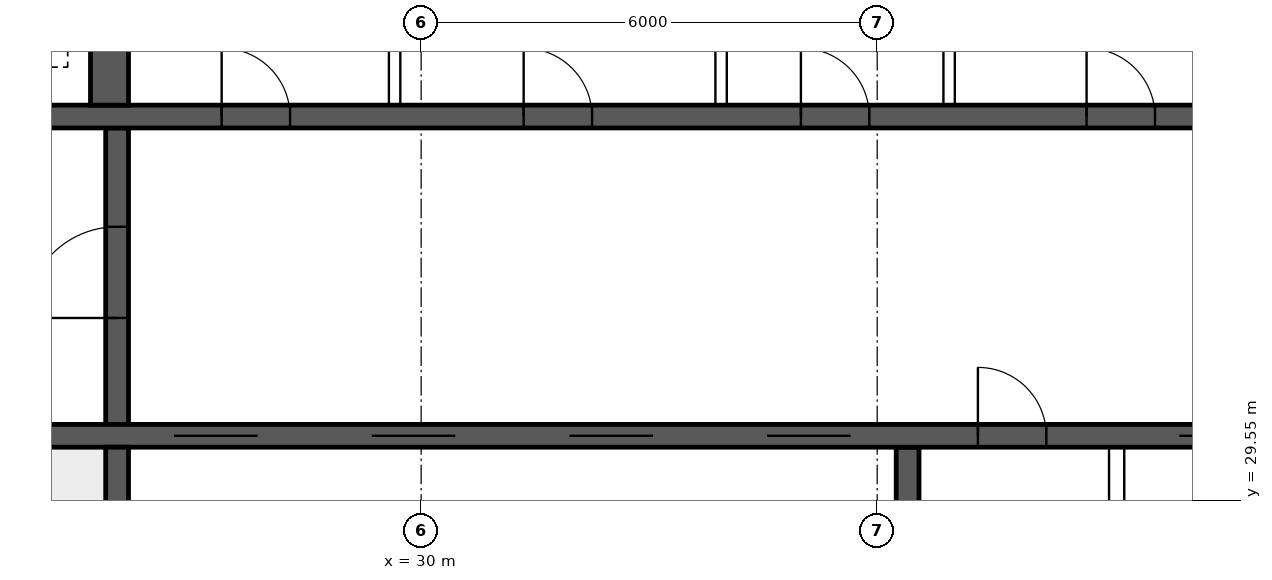
"""IFC4 building model, lengths in metres.
Left out: names, types, materials, properties, quantities, classifications, styles, units other than length and angle.
Written with IfcOpenShell. Run it as: python <this file> out.ifc"""

import sys

from ifc_helpers import new_model, si_unit, direction, frame, frame_2d, origin, place, context, subcontext, project, spatial, rectangle, extrude, element, fill, save


model = new_model("IFC4")
c1 = context("Model", 3, precision=1e-05, world=origin(), true_north=direction((0.0, 1.0)))
c2 = subcontext(c1, "Body", "Model", "MODEL_VIEW")
j1 = project(units=[si_unit("LENGTHUNIT", "METRE"), si_unit("PLANEANGLEUNIT", "RADIAN")], contexts=[c1])
p1 = place(None, origin())
s1 = spatial("IfcSite", under=j1, at=p1, CompositionType="ELEMENT")
p2 = place(p1, origin())
s2 = spatial("IfcBuilding", under=s1, at=p2, CompositionType="ELEMENT")
p3 = place(p2, frame((0.0, 0.0, 140.35)))
s3 = spatial("IfcBuildingStorey", under=s2, at=p3, CompositionType="ELEMENT", Elevation=140.35)
p4 = place(p3, frame((18.475, 30.4, 0.0), z_axis=(0.0, 0.0, 1.0), x_axis=(1.0, 0.0, 0.0)))
e1 = element("IfcWall", 1, at=p4, inside=s3, PredefinedType="SHEAR", context=c2, shape_type="SweptSolid", body=[
    extrude(rectangle(XDim=47.05, YDim=0.3, at=frame_2d((23.525, 0.0))), origin(), (0.0, 0.0, 1.0), 4.5),
])
p5 = place(p4, frame((0.4, 0.0, 0.0)))
e2 = element("IfcOpeningElement", 2, at=p5, cuts=e1, PredefinedType="OPENING", context=c2, shape_type="SweptSolid", body=[
    extrude(rectangle(XDim=1.0, YDim=2.1, at=frame_2d((0.5, 1.05))), frame((0.0, 0.16, 0.0), z_axis=(0.0, -1.0, 0.0), x_axis=(1.0, 0.0, 0.0)), (0.0, 0.0, 1.0), 0.32),
])
p6 = place(p4, frame((45.65, 0.0, 0.0)))
e3 = element("IfcOpeningElement", 3, at=p6, cuts=e1, PredefinedType="OPENING", context=c2, shape_type="SweptSolid", body=[
    extrude(rectangle(XDim=1.0, YDim=2.1, at=frame_2d((0.5, 1.05))), frame((0.0, 0.16, 0.0), z_axis=(0.0, -1.0, 0.0), x_axis=(1.0, 0.0, 0.0)), (0.0, 0.0, 1.0), 0.32),
])
p7 = place(p4, frame((8.275, 0.0, 0.0)))
e4 = element("IfcOpeningElement", 4, at=p7, cuts=e1, PredefinedType="OPENING", context=c2, shape_type="SweptSolid", body=[
    extrude(rectangle(XDim=1.1, YDim=2.1, at=frame_2d((0.55, 1.05))), frame((0.0, 0.16, 0.0), z_axis=(0.0, -1.0, 0.0), x_axis=(1.0, 0.0, 0.0)), (0.0, 0.0, 1.0), 0.32),
])
p8 = place(p4, frame((10.875, 0.0, 0.0)))
e5 = element("IfcOpeningElement", 5, at=p8, cuts=e1, PredefinedType="OPENING", context=c2, shape_type="SweptSolid", body=[
    extrude(rectangle(XDim=1.1, YDim=2.1, at=frame_2d((0.55, 1.05))), frame((0.0, 0.16, 0.0), z_axis=(0.0, -1.0, 0.0), x_axis=(1.0, 0.0, 0.0)), (0.0, 0.0, 1.0), 0.32),
])
p9 = place(p4, frame((13.475, 0.0, 0.0)))
e6 = element("IfcOpeningElement", 6, at=p9, cuts=e1, PredefinedType="OPENING", context=c2, shape_type="SweptSolid", body=[
    extrude(rectangle(XDim=1.1, YDim=2.1, at=frame_2d((0.55, 1.05))), frame((0.0, 0.16, 0.0), z_axis=(0.0, -1.0, 0.0), x_axis=(1.0, 0.0, 0.0)), (0.0, 0.0, 1.0), 0.32),
])
p10 = place(p4, frame((16.075, 0.0, 0.0)))
e7 = element("IfcOpeningElement", 7, at=p10, cuts=e1, PredefinedType="OPENING", context=c2, shape_type="SweptSolid", body=[
    extrude(rectangle(XDim=1.1, YDim=2.1, at=frame_2d((0.55, 1.05))), frame((0.0, 0.16, 0.0), z_axis=(0.0, -1.0, 0.0), x_axis=(1.0, 0.0, 0.0)), (0.0, 0.0, 1.0), 0.32),
])
p11 = place(p4, frame((18.85, 0.0, 0.0)))
e8 = element("IfcOpeningElement", 8, at=p11, cuts=e1, PredefinedType="OPENING", context=c2, shape_type="SweptSolid", body=[
    extrude(rectangle(XDim=0.9, YDim=2.1, at=frame_2d((0.45, 1.05))), frame((0.0, 0.16, 0.0), z_axis=(0.0, -1.0, 0.0), x_axis=(1.0, 0.0, 0.0)), (0.0, 0.0, 1.0), 0.32),
])
p12 = place(p4, frame((21.5, 0.0, 0.0)))
e9 = element("IfcOpeningElement", 9, at=p12, cuts=e1, PredefinedType="OPENING", context=c2, shape_type="SweptSolid", body=[
    extrude(rectangle(XDim=1.1, YDim=2.1, at=frame_2d((0.55, 1.05))), frame((0.0, 0.16, 0.0), z_axis=(0.0, -1.0, 0.0), x_axis=(1.0, 0.0, 0.0)), (0.0, 0.0, 1.0), 0.32),
])
p13 = place(p4, frame((30.142, 0.0, 0.0)))
e10 = element("IfcOpeningElement", 10, at=p13, cuts=e1, PredefinedType="OPENING", context=c2, shape_type="SweptSolid", body=[
    extrude(rectangle(XDim=1.1, YDim=2.1, at=frame_2d((0.55, 1.05))), frame((0.0, 0.16, 0.0), z_axis=(0.0, -1.0, 0.0), x_axis=(1.0, 0.0, 0.0)), (0.0, 0.0, 1.0), 0.32),
])
p14 = place(p4, frame((33.675, 0.0, 0.0)))
e11 = element("IfcOpeningElement", 11, at=p14, cuts=e1, PredefinedType="OPENING", context=c2, shape_type="SweptSolid", body=[
    extrude(rectangle(XDim=1.1, YDim=2.1, at=frame_2d((0.55, 1.05))), frame((0.0, 0.16, 0.0), z_axis=(0.0, -1.0, 0.0), x_axis=(1.0, 0.0, 0.0)), (0.0, 0.0, 1.0), 0.32),
])
p15 = place(p4, frame((37.208, 0.0, 0.0)))
e12 = element("IfcOpeningElement", 12, at=p15, cuts=e1, PredefinedType="OPENING", context=c2, shape_type="SweptSolid", body=[
    extrude(rectangle(XDim=1.1, YDim=2.1, at=frame_2d((0.55, 1.05))), frame((0.0, 0.16, 0.0), z_axis=(0.0, -1.0, 0.0), x_axis=(1.0, 0.0, 0.0)), (0.0, 0.0, 1.0), 0.32),
])
p16 = place(p3, frame((18.475, 34.6, 0.0), z_axis=(0.0, 0.0, 1.0), x_axis=(1.0, 0.0, 0.0)))
e13 = element("IfcWall", 13, at=p16, inside=s3, PredefinedType="SHEAR", context=c2, shape_type="SweptSolid", body=[
    extrude(rectangle(XDim=47.05, YDim=0.3, at=frame_2d((23.525, 0.0))), origin(), (0.0, 0.0, 1.0), 4.5),
])
p17 = place(p16, frame((0.9, 0.0, 0.0)))
e14 = element("IfcOpeningElement", 14, at=p17, cuts=e13, PredefinedType="OPENING", context=c2, shape_type="SweptSolid", body=[
    extrude(rectangle(XDim=1.1, YDim=2.1, at=frame_2d((0.55, 1.05))), frame((0.0, 0.16, 0.0), z_axis=(0.0, -1.0, 0.0), x_axis=(1.0, 0.0, 0.0)), (0.0, 0.0, 1.0), 0.32),
])
p18 = place(p16, frame((45.05, 0.0, 0.0)))
e15 = element("IfcOpeningElement", 15, at=p18, cuts=e13, PredefinedType="OPENING", context=c2, shape_type="SweptSolid", body=[
    extrude(rectangle(XDim=1.1, YDim=2.1, at=frame_2d((0.55, 1.05))), frame((0.0, 0.16, 0.0), z_axis=(0.0, -1.0, 0.0), x_axis=(1.0, 0.0, 0.0)), (0.0, 0.0, 1.0), 0.32),
])
p19 = place(p16, frame((4.125, 0.0, 0.0)))
e16 = element("IfcOpeningElement", 16, at=p19, cuts=e13, PredefinedType="OPENING", context=c2, shape_type="SweptSolid", body=[
    extrude(rectangle(XDim=0.9, YDim=2.1, at=frame_2d((0.45, 1.05))), frame((0.0, 0.16, 0.0), z_axis=(0.0, -1.0, 0.0), x_axis=(1.0, 0.0, 0.0)), (0.0, 0.0, 1.0), 0.32),
])
p20 = place(p16, frame((42.025, 0.0, 0.0)))
e17 = element("IfcOpeningElement", 17, at=p20, cuts=e13, PredefinedType="OPENING", context=c2, shape_type="SweptSolid", body=[
    extrude(rectangle(XDim=0.9, YDim=2.1, at=frame_2d((0.45, 1.05))), frame((0.0, 0.16, 0.0), z_axis=(0.0, -1.0, 0.0), x_axis=(1.0, 0.0, 0.0)), (0.0, 0.0, 1.0), 0.32),
])
p21 = place(p16, frame((8.9, 0.0, 0.0)))
e18 = element("IfcOpeningElement", 18, at=p21, cuts=e13, PredefinedType="OPENING", context=c2, shape_type="SweptSolid", body=[
    extrude(rectangle(XDim=0.9, YDim=2.1, at=frame_2d((0.45, 1.05))), frame((0.0, 0.16, 0.0), z_axis=(0.0, -1.0, 0.0), x_axis=(1.0, 0.0, 0.0)), (0.0, 0.0, 1.0), 0.32),
])
p22 = place(p16, frame((12.874, 0.0, 0.0)))
e19 = element("IfcOpeningElement", 19, at=p22, cuts=e13, PredefinedType="OPENING", context=c2, shape_type="SweptSolid", body=[
    extrude(rectangle(XDim=0.9, YDim=2.1, at=frame_2d((0.45, 1.05))), frame((0.0, 0.16, 0.0), z_axis=(0.0, -1.0, 0.0), x_axis=(1.0, 0.0, 0.0)), (0.0, 0.0, 1.0), 0.32),
])
p23 = place(p16, frame((16.521, 0.0, 0.0)))
e20 = element("IfcOpeningElement", 20, at=p23, cuts=e13, PredefinedType="OPENING", context=c2, shape_type="SweptSolid", body=[
    extrude(rectangle(XDim=0.9, YDim=2.1, at=frame_2d((0.45, 1.05))), frame((0.0, 0.16, 0.0), z_axis=(0.0, -1.0, 0.0), x_axis=(1.0, 0.0, 0.0)), (0.0, 0.0, 1.0), 0.32),
])
p24 = place(p16, frame((20.28, 0.0, 0.0)))
e21 = element("IfcOpeningElement", 21, at=p24, cuts=e13, PredefinedType="OPENING", context=c2, shape_type="SweptSolid", body=[
    extrude(rectangle(XDim=0.9, YDim=2.1, at=frame_2d((0.45, 1.05))), frame((0.0, 0.16, 0.0), z_axis=(0.0, -1.0, 0.0), x_axis=(1.0, 0.0, 0.0)), (0.0, 0.0, 1.0), 0.32),
])
p25 = place(p16, frame((24.686, 0.0, 0.0)))
e22 = element("IfcOpeningElement", 22, at=p25, cuts=e13, PredefinedType="OPENING", context=c2, shape_type="SweptSolid", body=[
    extrude(rectangle(XDim=0.9, YDim=2.1, at=frame_2d((0.45, 1.05))), frame((0.0, 0.16, 0.0), z_axis=(0.0, -1.0, 0.0), x_axis=(1.0, 0.0, 0.0)), (0.0, 0.0, 1.0), 0.32),
])
p26 = place(p16, frame((27.483, 0.0, 0.0)))
e23 = element("IfcOpeningElement", 23, at=p26, cuts=e13, PredefinedType="OPENING", context=c2, shape_type="SweptSolid", body=[
    extrude(rectangle(XDim=0.9, YDim=2.1, at=frame_2d((0.45, 1.05))), frame((0.0, 0.16, 0.0), z_axis=(0.0, -1.0, 0.0), x_axis=(1.0, 0.0, 0.0)), (0.0, 0.0, 1.0), 0.32),
])
p27 = place(p16, frame((30.666, 0.0, 0.0)))
e24 = element("IfcOpeningElement", 24, at=p27, cuts=e13, PredefinedType="OPENING", context=c2, shape_type="SweptSolid", body=[
    extrude(rectangle(XDim=0.9, YDim=2.1, at=frame_2d((0.45, 1.05))), frame((0.0, 0.16, 0.0), z_axis=(0.0, -1.0, 0.0), x_axis=(1.0, 0.0, 0.0)), (0.0, 0.0, 1.0), 0.32),
])
p28 = place(p16, frame((34.617, 0.0, 0.0)))
e25 = element("IfcOpeningElement", 25, at=p28, cuts=e13, PredefinedType="OPENING", context=c2, shape_type="SweptSolid", body=[
    extrude(rectangle(XDim=0.9, YDim=2.1, at=frame_2d((0.45, 1.05))), frame((0.0, 0.16, 0.0), z_axis=(0.0, -1.0, 0.0), x_axis=(1.0, 0.0, 0.0)), (0.0, 0.0, 1.0), 0.32),
])
p29 = place(p16, frame((37.555, 0.0, 0.0)))
e26 = element("IfcOpeningElement", 26, at=p29, cuts=e13, PredefinedType="OPENING", context=c2, shape_type="SweptSolid", body=[
    extrude(rectangle(XDim=0.9, YDim=2.1, at=frame_2d((0.45, 1.05))), frame((0.0, 0.16, 0.0), z_axis=(0.0, -1.0, 0.0), x_axis=(1.0, 0.0, 0.0)), (0.0, 0.0, 1.0), 0.32),
])
p30 = place(p3, frame((26.0, 26.275, 0.0), z_axis=(0.0, 0.0, 1.0), x_axis=(0.0, 1.0, 0.0)))
e27 = element("IfcWall", 27, at=p30, inside=s3, PredefinedType="SHEAR", context=c2, shape_type="SweptSolid", body=[
    extrude(rectangle(XDim=3.975, YDim=0.3, at=frame_2d((1.988, 0.0))), origin(), (0.0, 0.0, 1.0), 4.5),
])
p31 = place(p3, frame((26.0, 30.55, 0.0), z_axis=(0.0, 0.0, 1.0), x_axis=(0.0, 1.0, 0.0)))
e28 = element("IfcWall", 28, at=p31, inside=s3, PredefinedType="SHEAR", context=c2, shape_type="SweptSolid", body=[
    extrude(rectangle(XDim=3.9, YDim=0.3, at=frame_2d((1.95, 0.0))), origin(), (0.0, 0.0, 1.0), 4.5),
])
p32 = place(p31, frame((1.4, 0.0, 0.0)))
e29 = element("IfcOpeningElement", 29, at=p32, cuts=e28, PredefinedType="OPENING", context=c2, shape_type="SweptSolid", body=[
    extrude(rectangle(XDim=1.2, YDim=2.1, at=frame_2d((0.6, 1.05))), frame((0.0, 0.16, 0.0), z_axis=(0.0, -1.0, 0.0), x_axis=(1.0, 0.0, 0.0)), (0.0, 0.0, 1.0), 0.32),
])
p33 = place(p3, frame((25.9, 34.75, 0.0), z_axis=(0.0, 0.0, 1.0), x_axis=(0.0, 1.0, 0.0)))
e30 = element("IfcWall", 30, at=p33, inside=s3, PredefinedType="SHEAR", context=c2, shape_type="SweptSolid", body=[
    extrude(rectangle(XDim=2.975, YDim=0.5, at=frame_2d((1.488, 0.0))), origin(), (0.0, 0.0, 1.0), 4.5),
])
p34 = place(p3, frame((36.4, 26.275, 0.0), z_axis=(0.0, 0.0, 1.0), x_axis=(0.0, 1.0, 0.0)))
e31 = element("IfcWall", 31, at=p34, inside=s3, PredefinedType="SHEAR", context=c2, shape_type="SweptSolid", body=[
    extrude(rectangle(XDim=3.975, YDim=0.3, at=frame_2d((1.988, 0.0))), origin(), (0.0, 0.0, 1.0), 4.5),
])
for number, where, z_axis, x_axis in (
    (32, (29.651, 34.75, 0.0), (0.0, 0.0, 1.0), (0.0, 1.0, 0.0)),
    (33, (33.946, 34.75, 0.0), (0.0, 0.0, 1.0), (0.0, 1.0, 0.0)),
    (34, (36.946, 34.75, 0.0), (0.0, 0.0, 1.0), (0.0, 1.0, 0.0)),
):
    element("IfcWall", number, at=place(p3, frame(where, z_axis=z_axis, x_axis=x_axis)), inside=s3, PredefinedType="SOLIDWALL", context=c2, shape_type="SweptSolid", body=[
        extrude(rectangle(XDim=2.975, YDim=0.15, at=frame_2d((1.488, 0.0))), origin(), (0.0, 0.0, 1.0), 4.25),
    ])
p35 = place(p3, frame((39.15, 26.275, 0.0), z_axis=(0.0, 0.0, 1.0), x_axis=(0.0, 1.0, 0.0)))
e35 = element("IfcWall", 35, at=p35, inside=s3, PredefinedType="SOLIDWALL", context=c2, shape_type="SweptSolid", body=[
    extrude(rectangle(XDim=3.975, YDim=0.2, at=frame_2d((1.988, 0.0))), origin(), (0.0, 0.0, 1.0), 4.25),
])
p36 = place(p32, origin())
e36 = element("IfcDoor", 36, at=p36, inside=s3, OperationType="SINGLE_SWING_LEFT", PredefinedType="DOOR", context=c2, shape_type="SweptSolid", body=[
    extrude(rectangle(XDim=1.2, YDim=2.1, at=frame_2d((0.6, 1.05))), frame((0.0, 0.025, 0.0), z_axis=(0.0, -1.0, 0.0), x_axis=(1.0, 0.0, 0.0)), (0.0, 0.0, 1.0), 0.05),
])
fill(e29, e36)
p37 = place(p21, origin())
e37 = element("IfcDoor", 37, at=p37, inside=s3, OperationType="SINGLE_SWING_LEFT", PredefinedType="DOOR", context=c2, shape_type="SweptSolid", body=[
    extrude(rectangle(XDim=0.9, YDim=2.1, at=frame_2d((0.45, 1.05))), frame((0.0, 0.025, 0.0), z_axis=(0.0, -1.0, 0.0), x_axis=(1.0, 0.0, 0.0)), (0.0, 0.0, 1.0), 0.05),
])
fill(e18, e37)
p38 = place(p22, origin())
e38 = element("IfcDoor", 38, at=p38, inside=s3, OperationType="SINGLE_SWING_LEFT", PredefinedType="DOOR", context=c2, shape_type="SweptSolid", body=[
    extrude(rectangle(XDim=0.9, YDim=2.1, at=frame_2d((0.45, 1.05))), frame((0.0, 0.025, 0.0), z_axis=(0.0, -1.0, 0.0), x_axis=(1.0, 0.0, 0.0)), (0.0, 0.0, 1.0), 0.05),
])
fill(e19, e38)
p39 = place(p23, origin())
e39 = element("IfcDoor", 39, at=p39, inside=s3, OperationType="SINGLE_SWING_LEFT", PredefinedType="DOOR", context=c2, shape_type="SweptSolid", body=[
    extrude(rectangle(XDim=0.9, YDim=2.1, at=frame_2d((0.45, 1.05))), frame((0.0, 0.025, 0.0), z_axis=(0.0, -1.0, 0.0), x_axis=(1.0, 0.0, 0.0)), (0.0, 0.0, 1.0), 0.05),
])
fill(e20, e39)
p40 = place(p24, origin())
e40 = element("IfcDoor", 40, at=p40, inside=s3, OperationType="SINGLE_SWING_LEFT", PredefinedType="DOOR", context=c2, shape_type="SweptSolid", body=[
    extrude(rectangle(XDim=0.9, YDim=2.1, at=frame_2d((0.45, 1.05))), frame((0.0, 0.025, 0.0), z_axis=(0.0, -1.0, 0.0), x_axis=(1.0, 0.0, 0.0)), (0.0, 0.0, 1.0), 0.05),
])
fill(e21, e40)
p41 = place(p7, origin())
e41 = element("IfcDoor", 41, at=p41, inside=s3, OperationType="DOUBLE_DOOR_SLIDING", PredefinedType="DOOR", context=c2, shape_type="SweptSolid", body=[
    extrude(rectangle(XDim=1.1, YDim=2.1, at=frame_2d((0.55, 1.05))), frame((0.0, 0.025, 0.0), z_axis=(0.0, -1.0, 0.0), x_axis=(1.0, 0.0, 0.0)), (0.0, 0.0, 1.0), 0.05),
])
fill(e4, e41)
p42 = place(p8, origin())
e42 = element("IfcDoor", 42, at=p42, inside=s3, OperationType="DOUBLE_DOOR_SLIDING", PredefinedType="DOOR", context=c2, shape_type="SweptSolid", body=[
    extrude(rectangle(XDim=1.1, YDim=2.1, at=frame_2d((0.55, 1.05))), frame((0.0, 0.025, 0.0), z_axis=(0.0, -1.0, 0.0), x_axis=(1.0, 0.0, 0.0)), (0.0, 0.0, 1.0), 0.05),
])
fill(e5, e42)
p43 = place(p9, origin())
e43 = element("IfcDoor", 43, at=p43, inside=s3, OperationType="DOUBLE_DOOR_SLIDING", PredefinedType="DOOR", context=c2, shape_type="SweptSolid", body=[
    extrude(rectangle(XDim=1.1, YDim=2.1, at=frame_2d((0.55, 1.05))), frame((0.0, 0.025, 0.0), z_axis=(0.0, -1.0, 0.0), x_axis=(1.0, 0.0, 0.0)), (0.0, 0.0, 1.0), 0.05),
])
fill(e6, e43)
p44 = place(p10, origin())
e44 = element("IfcDoor", 44, at=p44, inside=s3, OperationType="DOUBLE_DOOR_SLIDING", PredefinedType="DOOR", context=c2, shape_type="SweptSolid", body=[
    extrude(rectangle(XDim=1.1, YDim=2.1, at=frame_2d((0.55, 1.05))), frame((0.0, 0.025, 0.0), z_axis=(0.0, -1.0, 0.0), x_axis=(1.0, 0.0, 0.0)), (0.0, 0.0, 1.0), 0.05),
])
fill(e7, e44)
p45 = place(p11, origin())
e45 = element("IfcDoor", 45, at=p45, inside=s3, OperationType="SINGLE_SWING_LEFT", PredefinedType="DOOR", context=c2, shape_type="SweptSolid", body=[
    extrude(rectangle(XDim=0.9, YDim=2.1, at=frame_2d((0.45, 1.05))), frame((0.0, 0.025, 0.0), z_axis=(0.0, -1.0, 0.0), x_axis=(1.0, 0.0, 0.0)), (0.0, 0.0, 1.0), 0.05),
])
fill(e8, e45)
p46 = place(p12, origin())
e46 = element("IfcDoor", 46, at=p46, inside=s3, OperationType="DOUBLE_DOOR_SLIDING", PredefinedType="DOOR", context=c2, shape_type="SweptSolid", body=[
    extrude(rectangle(XDim=1.1, YDim=2.1, at=frame_2d((0.55, 1.05))), frame((0.0, 0.025, 0.0), z_axis=(0.0, -1.0, 0.0), x_axis=(1.0, 0.0, 0.0)), (0.0, 0.0, 1.0), 0.05),
])
fill(e9, e46)
save(model, sys.argv[1])
